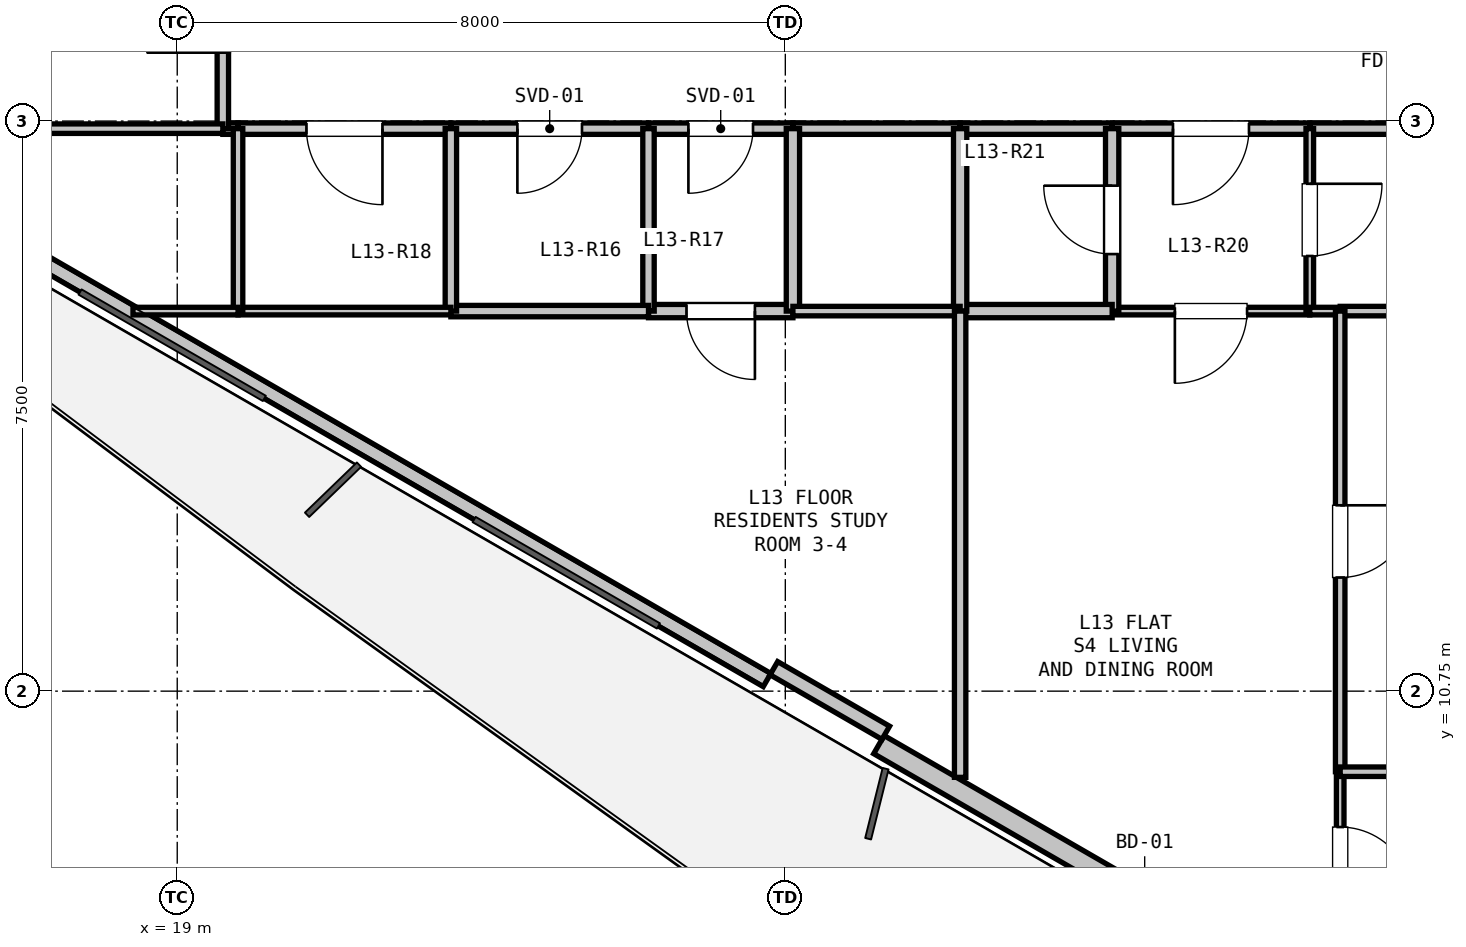
"""IFC4 building model, lengths in metres.
Left out: names, types, materials, properties, quantities, classifications, styles, units other than length and angle.
Written with IfcOpenShell. Run it as: python <this file> out.ifc"""

import sys

from ifc_helpers import new_model, si_unit, direction, frame, frame_2d, origin, place, context, subcontext, project, spatial, rectangle, extrude, element, fill, save


model = new_model("IFC4")
c1 = context("Model", 3, precision=1e-05, world=origin(), true_north=direction((0.0, 1.0)))
c2 = subcontext(c1, "Body", "Model", "MODEL_VIEW")
j1 = project(units=[si_unit("LENGTHUNIT", "METRE"), si_unit("PLANEANGLEUNIT", "RADIAN")], contexts=[c1])
p1 = place(None, origin())
s1 = spatial("IfcSite", under=j1, at=p1, CompositionType="ELEMENT")
p2 = place(p1, origin())
s2 = spatial("IfcBuilding", under=s1, at=p2, CompositionType="ELEMENT")
p3 = place(p2, frame((0.0, 0.0, 48.9)))
s3 = spatial("IfcBuildingStorey", under=s2, at=p3, CompositionType="ELEMENT", Elevation=48.9)
p4 = place(p3, frame((39.207, 3.71, 0.0), z_axis=(0.0, 0.0, 1.0), x_axis=(-0.86603192154, 0.499988710747, 0.0)))
e1 = element("IfcWall", 1, at=p4, inside=s3, PredefinedType="SOLIDWALL", context=c2, shape_type="SweptSolid", body=[
    extrude(rectangle(XDim=12.673, YDim=0.275, at=frame_2d((6.336, 0.0))), origin(), (0.0, 0.0, 1.0), 2.66),
])
p5 = place(p4, frame((8.136, 0.0, 0.0)))
e2 = element("IfcOpeningElement", 2, at=p5, cuts=e1, PredefinedType="OPENING", context=c2, shape_type="SweptSolid", body=[
    extrude(rectangle(XDim=1.0, YDim=2.1, at=frame_2d((0.5, 1.05))), frame((0.0, 0.147, 0.0), z_axis=(0.0, -1.0, 0.0), x_axis=(1.0, 0.0, 0.0)), (0.0, 0.0, 1.0), 0.295),
])
p6 = place(p4, frame((2.518, 0.0, 0.9)))
e3 = element("IfcOpeningElement", 3, at=p6, cuts=e1, PredefinedType="OPENING", context=c2, shape_type="SweptSolid", body=[
    extrude(rectangle(XDim=1.2, YDim=1.4, at=frame_2d((0.6, 0.7))), frame((0.0, 0.147, 0.0), z_axis=(0.0, -1.0, 0.0), x_axis=(1.0, 0.0, 0.0)), (0.0, 0.0, 1.0), 0.295),
])
p7 = place(p3, frame((26.76, 10.896, 0.0), z_axis=(0.0, 0.0, 1.0), x_axis=(-0.866027351828, 0.499996625875, 0.0)))
e4 = element("IfcWall", 4, at=p7, inside=s3, PredefinedType="PARAPET", context=c2, shape_type="SweptSolid", body=[
    extrude(rectangle(XDim=11.973, YDim=0.2, at=frame_2d((5.987, 0.0))), origin(), (0.0, 0.0, 1.0), 0.2),
])
p8 = place(p3, frame((28.322, 10.202, 0.0), z_axis=(0.0, 0.0, 1.0), x_axis=(-0.86605165483, 0.499954529098, 0.0)))
e5 = element("IfcWall", 5, at=p8, inside=s3, PredefinedType="PARAPET", context=c2, shape_type="SweptSolid", body=[
    extrude(rectangle(XDim=1.7, YDim=0.2, at=frame_2d((0.85, 0.0))), origin(), (0.0, 0.0, 1.0), 2.66),
])
p9 = place(p3, frame((35.8, 18.15, 0.0), z_axis=(0.0, 0.0, 1.0), x_axis=(-1.0, 0.0, 0.0)))
e6 = element("IfcWall", 6, at=p9, inside=s3, PredefinedType="PARTITIONING", context=c2, shape_type="SweptSolid", body=[
    extrude(rectangle(XDim=1.9, YDim=0.15, at=frame_2d((0.95, 0.0))), origin(), (0.0, 0.0, 1.0), 3.04),
])
p10 = place(p3, frame((33.9, 18.15, 0.0), z_axis=(0.0, 0.0, 1.0), x_axis=(-1.0, 0.0, 0.0)))
e7 = element("IfcWall", 7, at=p10, inside=s3, PredefinedType="PARTITIONING", context=c2, shape_type="SweptSolid", body=[
    extrude(rectangle(XDim=2.6, YDim=0.15, at=frame_2d((1.3, 0.0))), origin(), (0.0, 0.0, 1.0), 3.04),
])
p11 = place(p10, frame((0.8, 0.0, 0.0)))
e8 = element("IfcOpeningElement", 8, at=p11, cuts=e7, PredefinedType="OPENING", context=c2, shape_type="SweptSolid", body=[
    extrude(rectangle(XDim=1.0, YDim=2.15, at=frame_2d((0.5, 1.075))), frame((0.0, 0.085, 0.0), z_axis=(0.0, -1.0, 0.0), x_axis=(1.0, 0.0, 0.0)), (0.0, 0.0, 1.0), 0.17),
])
p12 = place(p3, frame((31.3, 18.15, 0.0), z_axis=(0.0, 0.0, 1.0), x_axis=(-1.0, 0.0, 0.0)))
e9 = element("IfcWall", 9, at=p12, inside=s3, PredefinedType="PARTITIONING", context=c2, shape_type="SweptSolid", body=[
    extrude(rectangle(XDim=2.0, YDim=0.15, at=frame_2d((1.0, 0.0))), origin(), (0.0, 0.0, 1.0), 3.04),
])
p13 = place(p3, frame((29.3, 18.15, 0.0), z_axis=(0.0, 0.0, 1.0), x_axis=(-1.0, 0.0, 0.0)))
e10 = element("IfcWall", 10, at=p13, inside=s3, PredefinedType="PARTITIONING", context=c2, shape_type="SweptSolid", body=[
    extrude(rectangle(XDim=2.2, YDim=0.15, at=frame_2d((1.1, 0.0))), origin(), (0.0, 0.0, 1.0), 3.04),
])
p14 = place(p3, frame((27.1, 18.15, 0.0), z_axis=(0.0, 0.0, 1.0), x_axis=(-1.0, 0.0, 0.0)))
e11 = element("IfcWall", 11, at=p14, inside=s3, PredefinedType="PARTITIONING", context=c2, shape_type="SweptSolid", body=[
    extrude(rectangle(XDim=1.9, YDim=0.15, at=frame_2d((0.95, 0.0))), origin(), (0.0, 0.0, 1.0), 3.04),
])
p15 = place(p14, frame((0.525, 0.0, 0.0)))
e12 = element("IfcOpeningElement", 12, at=p15, cuts=e11, PredefinedType="OPENING", context=c2, shape_type="SweptSolid", body=[
    extrude(rectangle(XDim=0.85, YDim=2.1, at=frame_2d((0.425, 1.05))), frame((0.0, 0.085, 0.0), z_axis=(0.0, -1.0, 0.0), x_axis=(1.0, 0.0, 0.0)), (0.0, 0.0, 1.0), 0.17),
])
p16 = place(p3, frame((25.2, 18.15, 0.0), z_axis=(0.0, 0.0, 1.0), x_axis=(-1.0, 0.0, 0.0)))
e13 = element("IfcWall", 13, at=p16, inside=s3, PredefinedType="PARTITIONING", context=c2, shape_type="SweptSolid", body=[
    extrude(rectangle(XDim=2.6, YDim=0.15, at=frame_2d((1.3, 0.0))), origin(), (0.0, 0.0, 1.0), 2.338),
])
p17 = place(p16, frame((0.875, 0.0, 0.0)))
e14 = element("IfcOpeningElement", 14, at=p17, cuts=e13, PredefinedType="OPENING", context=c2, shape_type="SweptSolid", body=[
    extrude(rectangle(XDim=0.85, YDim=2.1, at=frame_2d((0.425, 1.05))), frame((0.0, 0.085, 0.0), z_axis=(0.0, -1.0, 0.0), x_axis=(1.0, 0.0, 0.0)), (0.0, 0.0, 1.0), 0.17),
])
p18 = place(p3, frame((22.6, 18.15, 0.0), z_axis=(0.0, 0.0, 1.0), x_axis=(-1.0, 0.0, 0.0)))
e15 = element("IfcWall", 15, at=p18, inside=s3, PredefinedType="PARTITIONING", context=c2, shape_type="SweptSolid", body=[
    extrude(rectangle(XDim=2.8, YDim=0.15, at=frame_2d((1.4, 0.0))), origin(), (0.0, 0.0, 1.0), 3.04),
])
p19 = place(p18, frame((0.9, 0.0, 0.0)))
e16 = element("IfcOpeningElement", 16, at=p19, cuts=e15, PredefinedType="OPENING", context=c2, shape_type="SweptSolid", body=[
    extrude(rectangle(XDim=1.0, YDim=2.15, at=frame_2d((0.5, 1.075))), frame((0.0, 0.085, 0.0), z_axis=(0.0, -1.0, 0.0), x_axis=(1.0, 0.0, 0.0)), (0.0, 0.0, 1.0), 0.17),
])
p20 = place(p3, frame((19.8, 18.15, 0.0), z_axis=(0.0, 0.0, 1.0), x_axis=(-1.0, 0.0, 0.0)))
e17 = element("IfcWall", 17, at=p20, inside=s3, PredefinedType="PARTITIONING", context=c2, shape_type="SweptSolid", body=[
    extrude(rectangle(XDim=0.2, YDim=0.15, at=frame_2d((0.1, 0.0))), origin(), (0.0, 0.0, 1.0), 3.04),
])
p21 = place(p3, frame((19.6, 18.15, 0.0), z_axis=(0.0, 0.0, 1.0), x_axis=(0.0, 1.0, 0.0)))
e18 = element("IfcWall", 18, at=p21, inside=s3, PredefinedType="PARTITIONING", context=c2, shape_type="SweptSolid", body=[
    extrude(rectangle(XDim=3.0, YDim=0.15, at=frame_2d((1.5, 0.0))), origin(), (0.0, 0.0, 1.0), 2.338),
])
p22 = place(p21, frame((1.0, 0.0, 0.0)))
e19 = element("IfcOpeningElement", 19, at=p22, cuts=e18, PredefinedType="OPENING", context=c2, shape_type="SweptSolid", body=[
    extrude(rectangle(XDim=1.0, YDim=2.15, at=frame_2d((0.5, 1.075))), frame((0.0, 0.085, 0.0), z_axis=(0.0, -1.0, 0.0), x_axis=(1.0, 0.0, 0.0)), (0.0, 0.0, 1.0), 0.17),
])
p23 = place(p3, frame((33.9, 15.75, 0.0), z_axis=(0.0, 0.0, 1.0), x_axis=(-1.0, 0.0, 0.0)))
e20 = element("IfcWall", 20, at=p23, inside=s3, PredefinedType="PARTITIONING", context=c2, shape_type="SweptSolid", body=[
    extrude(rectangle(XDim=2.6, YDim=0.1, at=frame_2d((1.3, 0.0))), origin(), (0.0, 0.0, 1.0), 3.04),
])
p24 = place(p23, frame((0.825, 0.0, 0.0)))
e21 = element("IfcOpeningElement", 21, at=p24, cuts=e20, PredefinedType="OPENING", context=c2, shape_type="SweptSolid", body=[
    extrude(rectangle(XDim=0.95, YDim=2.1, at=frame_2d((0.475, 1.05))), frame((0.0, 0.06, 0.0), z_axis=(0.0, -1.0, 0.0), x_axis=(1.0, 0.0, 0.0)), (0.0, 0.0, 1.0), 0.12),
])
p25 = place(p3, frame((31.3, 15.75, 0.0), z_axis=(0.0, 0.0, 1.0), x_axis=(0.0, 1.0, 0.0)))
e22 = element("IfcWall", 22, at=p25, inside=s3, PredefinedType="PLUMBINGWALL", context=c2, shape_type="SweptSolid", body=[
    extrude(rectangle(XDim=2.4, YDim=0.175, at=frame_2d((1.2, 0.0))), origin(), (0.0, 0.0, 1.0), 3.04),
])
p26 = place(p25, frame((0.75, 0.0, 0.0)))
e23 = element("IfcOpeningElement", 23, at=p26, cuts=e22, PredefinedType="OPENING", context=c2, shape_type="SweptSolid", body=[
    extrude(rectangle(XDim=0.9, YDim=2.1, at=frame_2d((0.45, 1.05))), frame((0.0, 0.097, 0.0), z_axis=(0.0, -1.0, 0.0), x_axis=(1.0, 0.0, 0.0)), (0.0, 0.0, 1.0), 0.195),
])
p27 = place(p3, frame((33.9, 18.15, 0.0), z_axis=(0.0, 0.0, 1.0), x_axis=(0.0, -1.0, 0.0)))
e24 = element("IfcWall", 24, at=p27, inside=s3, PredefinedType="PARTITIONING", context=c2, shape_type="SweptSolid", body=[
    extrude(rectangle(XDim=2.4, YDim=0.1, at=frame_2d((1.2, 0.0))), origin(), (0.0, 0.0, 1.0), 3.04),
])
p28 = place(p27, frame((0.725, 0.0, 0.0)))
e25 = element("IfcOpeningElement", 25, at=p28, cuts=e24, PredefinedType="OPENING", context=c2, shape_type="SweptSolid", body=[
    extrude(rectangle(XDim=0.95, YDim=2.1, at=frame_2d((0.475, 1.05))), frame((0.0, 0.06, 0.0), z_axis=(0.0, -1.0, 0.0), x_axis=(1.0, 0.0, 0.0)), (0.0, 0.0, 1.0), 0.12),
])
p29 = place(p3, frame((27.1, 15.75, 0.0), z_axis=(0.0, 0.0, 1.0), x_axis=(-1.0, 0.0, 0.0)))
e26 = element("IfcWall", 26, at=p29, inside=s3, PredefinedType="PLUMBINGWALL", context=c2, shape_type="SweptSolid", body=[
    extrude(rectangle(XDim=1.9, YDim=0.175, at=frame_2d((0.95, 0.0))), origin(), (0.0, 0.0, 1.0), 2.338),
])
p30 = place(p29, frame((0.5, 0.0, 0.0)))
e27 = element("IfcOpeningElement", 27, at=p30, cuts=e26, PredefinedType="OPENING", context=c2, shape_type="SweptSolid", body=[
    extrude(rectangle(XDim=0.9, YDim=2.1, at=frame_2d((0.45, 1.05))), frame((0.0, 0.097, 0.0), z_axis=(0.0, -1.0, 0.0), x_axis=(1.0, 0.0, 0.0)), (0.0, 0.0, 1.0), 0.195),
])
p31 = place(p3, frame((25.2, 15.75, 0.0), z_axis=(0.0, 0.0, 1.0), x_axis=(0.0, 1.0, 0.0)))
e28 = element("IfcWall", 28, at=p31, inside=s3, PredefinedType="PARTITIONING", context=c2, shape_type="SweptSolid", body=[
    extrude(rectangle(XDim=2.4, YDim=0.15, at=frame_2d((1.2, 0.0))), origin(), (0.0, 0.0, 1.0), 2.338),
])
p32 = place(p3, frame((27.1, 18.15, 0.0), z_axis=(0.0, 0.0, 1.0), x_axis=(0.0, -1.0, 0.0)))
e29 = element("IfcWall", 29, at=p32, inside=s3, PredefinedType="PLUMBINGWALL", context=c2, shape_type="SweptSolid", body=[
    extrude(rectangle(XDim=2.4, YDim=0.175, at=frame_2d((1.2, 0.0))), origin(), (0.0, 0.0, 1.0), 3.04),
])
p33 = place(p3, frame((31.3, 15.75, 0.0), z_axis=(0.0, 0.0, 1.0), x_axis=(-1.0, 0.0, 0.0)))
e30 = element("IfcWall", 30, at=p33, inside=s3, PredefinedType="PLUMBINGWALL", context=c2, shape_type="SweptSolid", body=[
    extrude(rectangle(XDim=2.0, YDim=0.175, at=frame_2d((1.0, 0.0))), origin(), (0.0, 0.0, 1.0), 3.04),
])
p34 = place(p3, frame((29.3, 15.75, 0.0), z_axis=(0.0, 0.0, 1.0), x_axis=(0.0, 1.0, 0.0)))
e31 = element("IfcWall", 31, at=p34, inside=s3, PredefinedType="PLUMBINGWALL", context=c2, shape_type="SweptSolid", body=[
    extrude(rectangle(XDim=2.4, YDim=0.175, at=frame_2d((1.2, 0.0))), origin(), (0.0, 0.0, 1.0), 3.04),
])
p35 = place(p3, frame((43.688, 15.75, 0.0), z_axis=(0.0, 0.0, 1.0), x_axis=(-1.0, 0.0, 0.0)))
e32 = element("IfcWall", 32, at=p35, inside=s3, PredefinedType="PARTITIONING", context=c2, shape_type="SweptSolid", body=[
    extrude(rectangle(XDim=9.388, YDim=0.125, at=frame_2d((4.694, 0.0))), origin(), (0.0, 0.0, 1.0), 2.338),
])
p36 = place(p35, frame((4.219, 0.0, 0.0)))
e33 = element("IfcOpeningElement", 33, at=p36, cuts=e32, PredefinedType="OPENING", context=c2, shape_type="SweptSolid", body=[
    extrude(rectangle(XDim=0.95, YDim=2.1, at=frame_2d((0.475, 1.05))), frame((0.0, 0.073, 0.0), z_axis=(0.0, -1.0, 0.0), x_axis=(1.0, 0.0, 0.0)), (0.0, 0.0, 1.0), 0.145),
])
p37 = place(p3, frame((34.3, 15.75, 0.0), z_axis=(0.0, 0.0, 1.0), x_axis=(-1.0, 0.0, 0.0)))
e34 = element("IfcWall", 34, at=p37, inside=s3, PredefinedType="PARTITIONING", context=c2, shape_type="SweptSolid", body=[
    extrude(rectangle(XDim=0.4, YDim=0.1, at=frame_2d((0.2, 0.0))), origin(), (0.0, 0.0, 1.0), 3.04),
])
p38 = place(p3, frame((19.6, 18.15, 0.0), z_axis=(0.0, 0.0, 1.0), x_axis=(-1.0, 0.0, 0.0)))
e35 = element("IfcWall", 35, at=p38, inside=s3, PredefinedType="PARTITIONING", context=c2, shape_type="SweptSolid", body=[
    extrude(rectangle(XDim=2.45, YDim=0.125, at=frame_2d((1.225, 0.0))), origin(), (0.0, 0.0, 1.0), 3.04),
])
p39 = place(p3, frame((25.2, 15.75, 0.0), z_axis=(0.0, 0.0, 1.0), x_axis=(-1.0, 0.0, 0.0)))
e36 = element("IfcWall", 36, at=p39, inside=s3, PredefinedType="PARTITIONING", context=c2, shape_type="SweptSolid", body=[
    extrude(rectangle(XDim=2.6, YDim=0.15, at=frame_2d((1.3, 0.0))), origin(), (0.0, 0.0, 1.0), 3.04),
])
p40 = place(p3, frame((22.6, 15.75, 0.0), z_axis=(0.0, 0.0, 1.0), x_axis=(0.0, 1.0, 0.0)))
e37 = element("IfcWall", 37, at=p40, inside=s3, PredefinedType="PARTITIONING", context=c2, shape_type="SweptSolid", body=[
    extrude(rectangle(XDim=2.4, YDim=0.15, at=frame_2d((1.2, 0.0))), origin(), (0.0, 0.0, 1.0), 3.04),
])
p41 = place(p3, frame((22.6, 15.75, 0.0), z_axis=(0.0, 0.0, 1.0), x_axis=(-1.0, 0.0, 0.0)))
e38 = element("IfcWall", 38, at=p41, inside=s3, PredefinedType="PARTITIONING", context=c2, shape_type="SweptSolid", body=[
    extrude(rectangle(XDim=2.8, YDim=0.1, at=frame_2d((1.4, 0.0))), origin(), (0.0, 0.0, 1.0), 2.65),
])
p42 = place(p3, frame((19.8, 15.75, 0.0), z_axis=(0.0, 0.0, 1.0), x_axis=(0.0, 1.0, 0.0)))
e39 = element("IfcWall", 39, at=p42, inside=s3, PredefinedType="PARTITIONING", context=c2, shape_type="SweptSolid", body=[
    extrude(rectangle(XDim=2.4, YDim=0.125, at=frame_2d((1.2, 0.0))), origin(), (0.0, 0.0, 1.0), 2.65),
])
p43 = place(p3, frame((18.418, 15.75, 0.0), z_axis=(0.0, 0.0, 1.0), x_axis=(1.0, 0.0, 0.0)))
e40 = element("IfcWall", 40, at=p43, inside=s3, PredefinedType="PARTITIONING", context=c2, shape_type="SweptSolid", body=[
    extrude(rectangle(XDim=1.382, YDim=0.1, at=frame_2d((0.691, 0.0))), origin(), (0.0, 0.0, 1.0), 2.365),
])
p44 = place(p3, frame((27.1, 15.75, 0.0), z_axis=(0.0, 0.0, 1.0), x_axis=(1.0, 0.0, 0.0)))
e41 = element("IfcWall", 41, at=p44, inside=s3, PredefinedType="PARTITIONING", context=c2, shape_type="SweptSolid", body=[
    extrude(rectangle(XDim=2.2, YDim=0.125, at=frame_2d((1.1, 0.0))), origin(), (0.0, 0.0, 1.0), 3.04),
])
p45 = place(p3, frame((29.3, 15.75, 0.0), z_axis=(0.0, 0.0, 1.0), x_axis=(0.0, -1.0, 0.0)))
e42 = element("IfcWall", 42, at=p45, inside=s3, PredefinedType="PARTITIONING", context=c2, shape_type="SweptSolid", body=[
    extrude(rectangle(XDim=6.134, YDim=0.15, at=frame_2d((3.067, 0.0))), origin(), (0.0, 0.0, 1.0), 2.338),
])
p46 = place(p3, frame((34.3, 15.75, 0.0), z_axis=(0.0, 0.0, 1.0), x_axis=(0.0, -1.0, 0.0)))
e43 = element("IfcWall", 43, at=p46, inside=s3, PredefinedType="PARTITIONING", context=c2, shape_type="SweptSolid", body=[
    extrude(rectangle(XDim=6.06, YDim=0.125, at=frame_2d((3.03, 0.0))), origin(), (0.0, 0.0, 1.0), 3.04),
])
p47 = place(p46, frame((2.555, 0.0, 0.0)))
e44 = element("IfcOpeningElement", 44, at=p47, cuts=e43, PredefinedType="OPENING", context=c2, shape_type="SweptSolid", body=[
    extrude(rectangle(XDim=0.95, YDim=2.1, at=frame_2d((0.475, 1.05))), frame((0.0, 0.073, 0.0), z_axis=(0.0, -1.0, 0.0), x_axis=(1.0, 0.0, 0.0)), (0.0, 0.0, 1.0), 0.145),
])
p48 = place(p3, frame((34.3, 9.69, 0.0), z_axis=(0.0, 0.0, 1.0), x_axis=(0.0, -1.0, 0.0)))
e45 = element("IfcWall", 45, at=p48, inside=s3, PredefinedType="PARTITIONING", context=c2, shape_type="SweptSolid", body=[
    extrude(rectangle(XDim=2.961, YDim=0.1, at=frame_2d((1.48, 0.0))), origin(), (0.0, 0.0, 1.0), 3.04),
])
p49 = place(p48, frame((0.728, 0.0, 0.0)))
e46 = element("IfcOpeningElement", 46, at=p49, cuts=e45, PredefinedType="OPENING", context=c2, shape_type="SweptSolid", body=[
    extrude(rectangle(XDim=0.95, YDim=2.1, at=frame_2d((0.475, 1.05))), frame((0.0, 0.06, 0.0), z_axis=(0.0, -1.0, 0.0), x_axis=(1.0, 0.0, 0.0)), (0.0, 0.0, 1.0), 0.12),
])
p50 = place(p3, frame((34.3, 9.69, 0.0), z_axis=(0.0, 0.0, 1.0), x_axis=(1.0, 0.0, 0.0)))
e47 = element("IfcWall", 47, at=p50, inside=s3, PredefinedType="PARTITIONING", context=c2, shape_type="SweptSolid", body=[
    extrude(rectangle(XDim=4.78, YDim=0.125, at=frame_2d((2.39, 0.0))), origin(), (0.0, 0.0, 1.0), 3.04),
])
p51 = place(p50, frame((1.915, 0.0, 0.0)))
e48 = element("IfcOpeningElement", 48, at=p51, cuts=e47, PredefinedType="OPENING", context=c2, shape_type="SweptSolid", body=[
    extrude(rectangle(XDim=0.95, YDim=2.1, at=frame_2d((0.475, 1.05))), frame((0.0, 0.073, 0.0), z_axis=(0.0, -1.0, 0.0), x_axis=(1.0, 0.0, 0.0)), (0.0, 0.0, 1.0), 0.145),
])
p52 = place(p11, origin())
e49 = element("IfcDoor", 49, at=p52, inside=s3, OperationType="SINGLE_SWING_RIGHT", PredefinedType="DOOR", context=c2, shape_type="SweptSolid", body=[
    extrude(rectangle(XDim=1.0, YDim=2.15, at=frame_2d((0.5, 1.075))), frame((0.0, 0.025, 0.0), z_axis=(0.0, -1.0, 0.0), x_axis=(1.0, 0.0, 0.0)), (0.0, 0.0, 1.0), 0.05),
])
fill(e8, e49)
p53 = place(p15, origin())
e50 = element("IfcDoor", 50, at=p53, inside=s3, OperationType="SINGLE_SWING_RIGHT", PredefinedType="DOOR", context=c2, shape_type="SweptSolid", body=[
    extrude(rectangle(XDim=0.85, YDim=2.1, at=frame_2d((0.425, 1.05))), frame((0.0, 0.025, 0.0), z_axis=(0.0, -1.0, 0.0), x_axis=(1.0, 0.0, 0.0)), (0.0, 0.0, 1.0), 0.05),
])
fill(e12, e50)
p54 = place(p17, origin())
e51 = element("IfcDoor", 51, at=p54, inside=s3, OperationType="SINGLE_SWING_RIGHT", PredefinedType="DOOR", context=c2, shape_type="SweptSolid", body=[
    extrude(rectangle(XDim=0.85, YDim=2.1, at=frame_2d((0.425, 1.05))), frame((0.0, 0.025, 0.0), z_axis=(0.0, -1.0, 0.0), x_axis=(1.0, 0.0, 0.0)), (0.0, 0.0, 1.0), 0.05),
])
fill(e14, e51)
p55 = place(p19, origin())
e52 = element("IfcDoor", 52, at=p55, inside=s3, OperationType="SINGLE_SWING_LEFT", PredefinedType="DOOR", context=c2, shape_type="SweptSolid", body=[
    extrude(rectangle(XDim=1.0, YDim=2.15, at=frame_2d((0.5, 1.075))), frame((0.0, 0.025, 0.0), z_axis=(0.0, -1.0, 0.0), x_axis=(1.0, 0.0, 0.0)), (0.0, 0.0, 1.0), 0.05),
])
fill(e16, e52)
p56 = place(p26, origin())
e53 = element("IfcDoor", 53, at=p56, inside=s3, OperationType="SINGLE_SWING_RIGHT", PredefinedType="DOOR", context=c2, shape_type="SweptSolid", body=[
    extrude(rectangle(XDim=0.9, YDim=2.1, at=frame_2d((0.45, 1.05))), frame((0.0, 0.025, 0.0), z_axis=(0.0, -1.0, 0.0), x_axis=(1.0, 0.0, 0.0)), (0.0, 0.0, 1.0), 0.05),
])
fill(e23, e53)
p57 = place(p28, origin())
e54 = element("IfcDoor", 54, at=p57, inside=s3, OperationType="SINGLE_SWING_LEFT", PredefinedType="DOOR", context=c2, shape_type="SweptSolid", body=[
    extrude(rectangle(XDim=0.95, YDim=2.1, at=frame_2d((0.475, 1.05))), frame((0.0, 0.025, 0.0), z_axis=(0.0, -1.0, 0.0), x_axis=(1.0, 0.0, 0.0)), (0.0, 0.0, 1.0), 0.05),
])
fill(e25, e54)
p58 = place(p24, origin())
e55 = element("IfcDoor", 55, at=p58, inside=s3, OperationType="SINGLE_SWING_RIGHT", PredefinedType="DOOR", context=c2, shape_type="SweptSolid", body=[
    extrude(rectangle(XDim=0.95, YDim=2.1, at=frame_2d((0.475, 1.05))), frame((0.0, 0.025, 0.0), z_axis=(0.0, -1.0, 0.0), x_axis=(1.0, 0.0, 0.0)), (0.0, 0.0, 1.0), 0.05),
])
fill(e21, e55)
p59 = place(p49, origin())
e56 = element("IfcDoor", 56, at=p59, inside=s3, OperationType="SINGLE_SWING_RIGHT", PredefinedType="DOOR", context=c2, shape_type="SweptSolid", body=[
    extrude(rectangle(XDim=0.95, YDim=2.1, at=frame_2d((0.475, 1.05))), frame((0.0, 0.025, 0.0), z_axis=(0.0, -1.0, 0.0), x_axis=(1.0, 0.0, 0.0)), (0.0, 0.0, 1.0), 0.05),
])
fill(e46, e56)
p60 = place(p47, origin())
e57 = element("IfcDoor", 57, at=p60, inside=s3, OperationType="SINGLE_SWING_LEFT", PredefinedType="DOOR", context=c2, shape_type="SweptSolid", body=[
    extrude(rectangle(XDim=0.95, YDim=2.1, at=frame_2d((0.475, 1.05))), frame((0.0, 0.025, 0.0), z_axis=(0.0, -1.0, 0.0), x_axis=(1.0, 0.0, 0.0)), (0.0, 0.0, 1.0), 0.05),
])
fill(e44, e57)
p61 = place(p30, origin())
e58 = element("IfcDoor", 58, at=p61, inside=s3, OperationType="SINGLE_SWING_LEFT", PredefinedType="DOOR", context=c2, shape_type="SweptSolid", body=[
    extrude(rectangle(XDim=0.9, YDim=2.1, at=frame_2d((0.45, 1.05))), frame((0.0, 0.025, 0.0), z_axis=(0.0, -1.0, 0.0), x_axis=(1.0, 0.0, 0.0)), (0.0, 0.0, 1.0), 0.05),
])
fill(e27, e58)
save(model, sys.argv[1])
